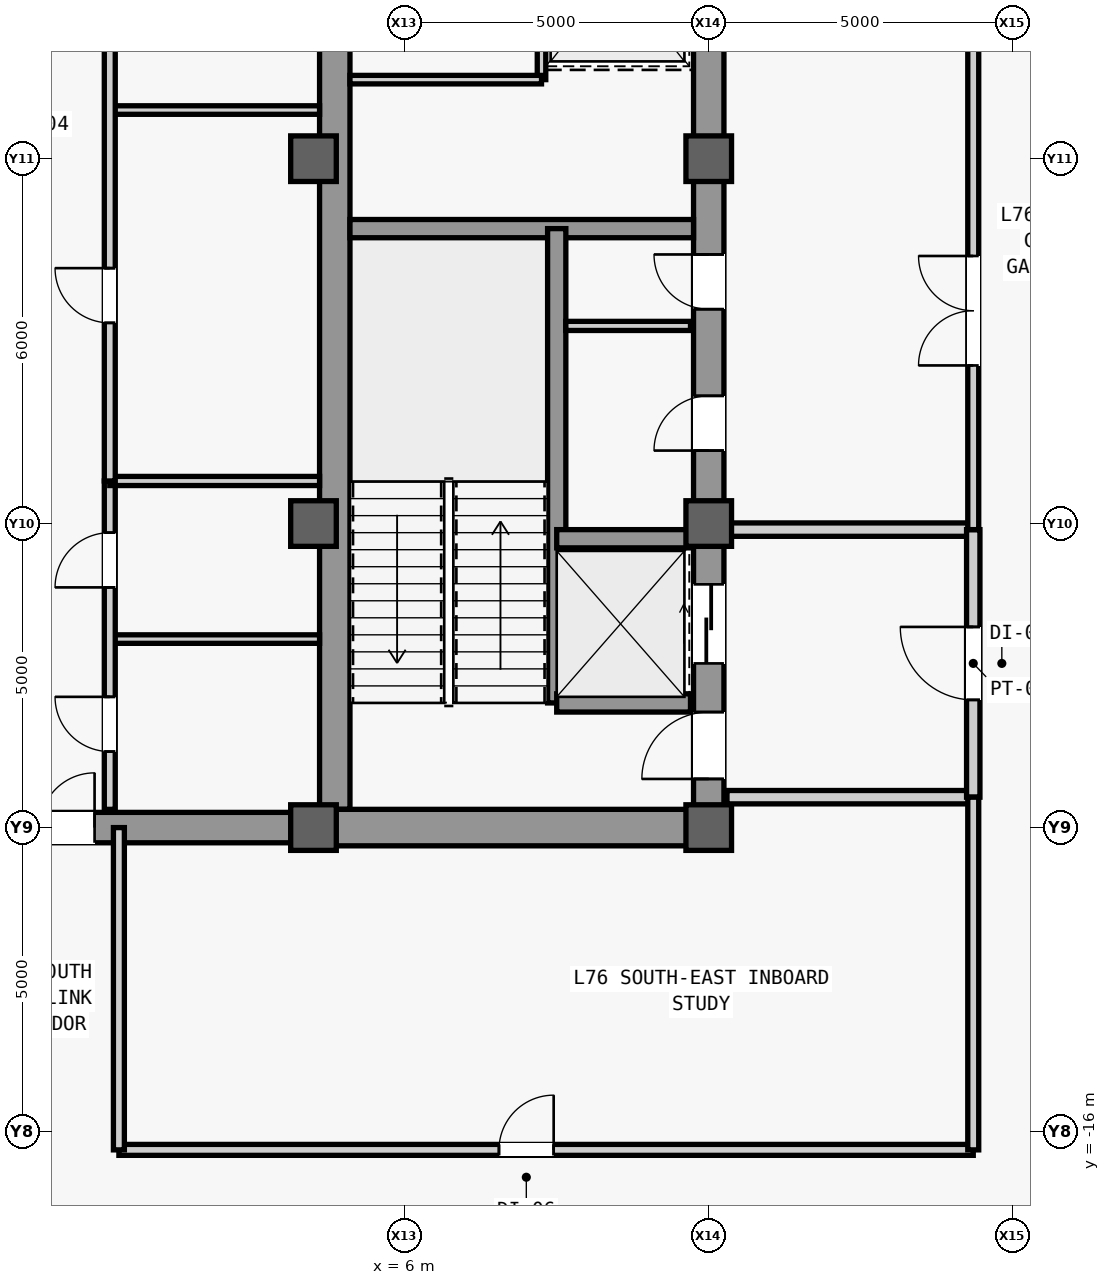
"""IFC4 building model, lengths in metres.
Left out: names, types, materials, properties, quantities, classifications, styles, units other than length and angle.
Written with IfcOpenShell. Run it as: python <this file> out.ifc"""

import sys

from ifc_helpers import new_model, si_unit, direction, frame, frame_2d, origin, origin_2d, place, context, subcontext, project, spatial, rectangle, extrude, source, transform, mapped, element, fill, save


model = new_model("IFC4")
c1 = context("Model", 3, precision=1e-05, world=origin(), true_north=direction((0.0, 1.0)))
c2 = subcontext(c1, "Body", "Model", "MODEL_VIEW")
j1 = project(units=[si_unit("LENGTHUNIT", "METRE"), si_unit("PLANEANGLEUNIT", "RADIAN")], contexts=[c1])
p1 = place(None, origin())
s1 = spatial("IfcSite", under=j1, at=p1, CompositionType="ELEMENT")
p2 = place(p1, origin())
s2 = spatial("IfcBuilding", under=s1, at=p2, CompositionType="ELEMENT")
p3 = place(p2, frame((0.0, 0.0, 321.5)))
s3 = spatial("IfcBuildingStorey", under=s2, at=p3, CompositionType="ELEMENT", Elevation=321.5)
m1 = source(origin(), c2, "Body", "SweptSolid", [
    extrude(rectangle(XDim=22.0, YDim=0.5, at=frame_2d((11.0, 0.0))), origin(), (0.0, 0.0, 1.0), 4.54),
])
p4 = place(p3, frame((11.0, -11.0, 0.0), z_axis=(0.0, 0.0, 1.0), x_axis=(0.0, 1.0, 0.0)))
e1 = element("IfcWall", 1, at=p4, inside=s3, PredefinedType="SHEAR", context=c2, shape_type="MappedRepresentation", body=[
    mapped(m1, transform((0.0, 0.0, 0.0), scale=1.0)),
])
m2 = source(origin(), c2, "Body", "SweptSolid", [
    extrude(rectangle(XDim=1.1, YDim=2.2, at=frame_2d((0.55, 1.1))), frame((0.0, 0.26, 0.0), z_axis=(0.0, -1.0, 0.0), x_axis=(1.0, 0.0, 0.0)), (0.0, 0.0, 1.0), 0.52),
])
p5 = place(p4, frame((0.8, 0.0, 0.0)))
e2 = element("IfcOpeningElement", 2, at=p5, cuts=e1, PredefinedType="OPENING", context=c2, shape_type="MappedRepresentation", body=[
    mapped(m2, transform((0.0, 0.0, 0.0), scale=1.0)),
])
m3 = source(origin(), c2, "Body", "SweptSolid", [
    extrude(rectangle(XDim=0.9, YDim=2.15, at=frame_2d((0.45, 1.075))), frame((0.0, 0.26, 0.0), z_axis=(0.0, -1.0, 0.0), x_axis=(1.0, 0.0, 0.0)), (0.0, 0.0, 1.0), 0.52),
])
p6 = place(p4, frame((6.2, 0.0, 0.0)))
e3 = element("IfcOpeningElement", 3, at=p6, cuts=e1, PredefinedType="OPENING", context=c2, shape_type="MappedRepresentation", body=[
    mapped(m3, transform((0.0, 0.0, 0.0), scale=1.0)),
])
p7 = place(p4, frame((8.525, 0.0, 0.0)))
e4 = element("IfcOpeningElement", 4, at=p7, cuts=e1, PredefinedType="OPENING", context=c2, shape_type="MappedRepresentation", body=[
    mapped(m3, transform((0.0, 0.0, 0.0), scale=1.0)),
])
m4 = source(origin(), c2, "Body", "SweptSolid", [
    extrude(rectangle(XDim=1.2, YDim=2.3, at=frame_2d((0.6, 1.15))), frame((0.0, 0.26, 0.0), z_axis=(0.0, -1.0, 0.0), x_axis=(1.0, 0.0, 0.0)), (0.0, 0.0, 1.0), 0.52),
])
p8 = place(p4, frame((17.6, 0.0, 0.0)))
e5 = element("IfcOpeningElement", 5, at=p8, cuts=e1, PredefinedType="OPENING", context=c2, shape_type="MappedRepresentation", body=[
    mapped(m4, transform((0.0, 0.0, 0.0), scale=1.0)),
])
p9 = place(p4, frame((19.6, 0.0, 0.0)))
e6 = element("IfcOpeningElement", 6, at=p9, cuts=e1, PredefinedType="OPENING", context=c2, shape_type="MappedRepresentation", body=[
    mapped(m4, transform((0.0, 0.0, 0.0), scale=1.0)),
])
m5 = source(origin(), c2, "Body", "SweptSolid", [
    extrude(rectangle(XDim=1.3, YDim=2.3, at=frame_2d((0.65, 1.15))), frame((0.0, 0.26, 0.0), z_axis=(0.0, -1.0, 0.0), x_axis=(1.0, 0.0, 0.0)), (0.0, 0.0, 1.0), 0.52),
])
p10 = place(p4, frame((2.7, 0.0, 0.0)))
e7 = element("IfcOpeningElement", 7, at=p10, cuts=e1, PredefinedType="OPENING", context=c2, shape_type="MappedRepresentation", body=[
    mapped(m5, transform((0.0, 0.0, 0.0), scale=1.0)),
])
p11 = place(p4, frame((13.35, 0.0, 0.0)))
e8 = element("IfcOpeningElement", 8, at=p11, cuts=e1, PredefinedType="OPENING", context=c2, shape_type="MappedRepresentation", body=[
    mapped(m5, transform((0.0, 0.0, 0.0), scale=1.0)),
])
m6 = source(origin(), c2, "Body", "SweptSolid", [
    extrude(rectangle(XDim=21.4, YDim=0.5, at=frame_2d((10.7, 0.0))), origin(), (0.0, 0.0, 1.0), 4.54),
])
p12 = place(p3, frame((4.85, -10.7, 0.0), z_axis=(0.0, 0.0, 1.0), x_axis=(0.0, 1.0, 0.0)))
e9 = element("IfcWall", 9, at=p12, inside=s3, PredefinedType="SHEAR", context=c2, shape_type="MappedRepresentation", body=[
    mapped(m6, transform((0.0, 0.0, 0.0), scale=1.0)),
])
m7 = source(origin(), c2, "Body", "SweptSolid", [
    extrude(rectangle(XDim=5.9, YDim=0.6, at=frame_2d((2.95, 0.0))), origin(), (0.0, 0.0, 1.0), 4.54),
])
p13 = place(p3, frame((4.85, -11.0, 0.0), z_axis=(0.0, 0.0, 1.0), x_axis=(1.0, 0.0, 0.0)))
e10 = element("IfcWall", 10, at=p13, inside=s3, PredefinedType="SHEAR", context=c2, shape_type="MappedRepresentation", body=[
    mapped(m7, transform((0.0, 0.0, 0.0), scale=1.0)),
])
m8 = source(origin(), c2, "Body", "SweptSolid", [
    extrude(rectangle(XDim=5.65, YDim=0.3, at=frame_2d((2.825, 0.0))), origin(), (0.0, 0.0, 1.0), 4.54),
])
p14 = place(p3, frame((5.1, -1.15, 0.0), z_axis=(0.0, 0.0, 1.0), x_axis=(1.0, 0.0, 0.0)))
e11 = element("IfcWall", 11, at=p14, inside=s3, PredefinedType="SHEAR", context=c2, shape_type="MappedRepresentation", body=[
    mapped(m8, transform((0.0, 0.0, 0.0), scale=1.0)),
])
m9 = source(origin(), c2, "Body", "SweptSolid", [
    extrude(rectangle(XDim=9.2, YDim=0.5, at=frame_2d((4.6, 0.0))), origin(), (0.0, 0.0, 1.0), 4.54),
])
p15 = place(p3, frame((-4.6, -11.0, 0.0), z_axis=(0.0, 0.0, 1.0), x_axis=(1.0, 0.0, 0.0)))
e12 = element("IfcWall", 12, at=p15, inside=s3, PredefinedType="SHEAR", context=c2, shape_type="MappedRepresentation", body=[
    mapped(m9, transform((0.0, 0.0, 0.0), scale=1.0)),
])
m10 = source(origin(), c2, "Body", "SweptSolid", [
    extrude(rectangle(XDim=1.8, YDim=2.25, at=frame_2d((0.9, 1.125))), frame((0.0, 0.26, 0.0), z_axis=(0.0, -1.0, 0.0), x_axis=(1.0, 0.0, 0.0)), (0.0, 0.0, 1.0), 0.52),
])
p16 = place(p15, frame((3.7, 0.0, 0.0)))
e13 = element("IfcOpeningElement", 13, at=p16, cuts=e12, PredefinedType="OPENING", context=c2, shape_type="MappedRepresentation", body=[
    mapped(m10, transform((0.0, 0.0, 0.0), scale=1.0)),
])
m11 = source(origin(), c2, "Body", "SweptSolid", [
    extrude(rectangle(XDim=0.75, YDim=0.75, at=origin_2d()), origin(), (0.0, 0.0, 1.0), 4.8),
])
for number, where, z_axis, x_axis in (
    (14, (4.5, -11.0, 0.0), (0.0, 0.0, 1.0), (1.0, 0.0, 0.0)),
    (15, (4.5, -6.0, 0.0), (0.0, 0.0, 1.0), (1.0, 0.0, 0.0)),
    (16, (4.5, 0.0, 0.0), (0.0, 0.0, 1.0), (1.0, 0.0, 0.0)),
    (17, (11.0, -11.0, 0.0), (0.0, 0.0, 1.0), (1.0, 0.0, 0.0)),
    (18, (11.0, -6.0, 0.0), (0.0, 0.0, 1.0), (1.0, 0.0, 0.0)),
    (19, (11.0, 0.0, 0.0), (0.0, 0.0, 1.0), (1.0, 0.0, 0.0)),
):
    element("IfcColumn", number, at=place(p3, frame(where, z_axis=z_axis, x_axis=x_axis)), inside=s3, PredefinedType="COLUMN", context=c2, shape_type="MappedRepresentation", body=[
        mapped(m11, transform((0.0, 0.0, 0.0), scale=1.0)),
    ])
m12 = source(origin(), c2, "Body", "SweptSolid", [
    extrude(rectangle(XDim=7.8, YDim=0.3, at=frame_2d((3.9, 0.0))), origin(), (0.0, 0.0, 1.0), 4.54),
])
p17 = place(p3, frame((8.5, -8.95, 0.0), z_axis=(0.0, 0.0, 1.0), x_axis=(0.0, 1.0, 0.0)))
e20 = element("IfcWall", 20, at=p17, inside=s3, PredefinedType="SHEAR", context=c2, shape_type="MappedRepresentation", body=[
    mapped(m12, transform((0.0, 0.0, 0.0), scale=1.0)),
])
m13 = source(origin(), c2, "Body", "SweptSolid", [
    extrude(rectangle(XDim=2.2, YDim=0.3, at=frame_2d((1.1, 0.0))), origin(), (0.0, 0.0, 1.0), 4.54),
])
for number, where, z_axis, x_axis in (
    (21, (8.5, -8.95, 0.0), (0.0, 0.0, 1.0), (1.0, 0.0, 0.0)),
    (22, (8.5, -6.25, 0.0), (0.0, 0.0, 1.0), (1.0, 0.0, 0.0)),
):
    element("IfcWall", number, at=place(p3, frame(where, z_axis=z_axis, x_axis=x_axis)), inside=s3, PredefinedType="SHEAR", context=c2, shape_type="MappedRepresentation", body=[
        mapped(m13, transform((0.0, 0.0, 0.0), scale=1.0)),
    ])
m14 = source(origin(), c2, "Body", "SweptSolid", [
    extrude(rectangle(XDim=2.05, YDim=0.15, at=frame_2d((1.025, 0.0))), origin(), (0.0, 0.0, 1.0), 4.54),
])
p18 = place(p3, frame((8.65, -2.75, 0.0), z_axis=(0.0, 0.0, 1.0), x_axis=(1.0, 0.0, 0.0)))
e23 = element("IfcWall", 23, at=p18, inside=s3, PredefinedType="PARTITIONING", context=c2, shape_type="MappedRepresentation", body=[
    mapped(m14, transform((0.0, 0.0, 0.0), scale=1.0)),
])
m15 = source(origin(), c2, "Body", "SweptSolid", [
    extrude(rectangle(XDim=9.4, YDim=0.14, at=frame_2d((4.7, 0.0))), origin(), (0.0, 0.0, 1.0), 4.54),
])
p19 = place(p3, frame((8.25, 1.3, 0.0), z_axis=(0.0, 0.0, 1.0), x_axis=(0.0, 1.0, 0.0)))
e24 = element("IfcWall", 24, at=p19, inside=s3, PredefinedType="PARTITIONING", context=c2, shape_type="MappedRepresentation", body=[
    mapped(m15, transform((0.0, 0.0, 0.0), scale=1.0)),
])
m16 = source(origin(), c2, "Body", "SweptSolid", [
    extrude(rectangle(XDim=3.15, YDim=0.14, at=frame_2d((1.575, 0.0))), origin(), (0.0, 0.0, 1.0), 4.54),
])
p20 = place(p3, frame((5.1, 1.3, 0.0), z_axis=(0.0, 0.0, 1.0), x_axis=(1.0, 0.0, 0.0)))
e25 = element("IfcWall", 25, at=p20, inside=s3, PredefinedType="PARTITIONING", context=c2, shape_type="MappedRepresentation", body=[
    mapped(m16, transform((0.0, 0.0, 0.0), scale=1.0)),
])
m17 = source(origin(), c2, "Body", "SweptSolid", [
    extrude(rectangle(XDim=4.05, YDim=0.22, at=frame_2d((2.025, 0.0))), origin(), (0.0, 0.0, 1.0), 4.54),
])
p21 = place(p3, frame((11.3, -10.5, 0.0), z_axis=(0.0, 0.0, 1.0), x_axis=(1.0, 0.0, 0.0)))
e26 = element("IfcWall", 26, at=p21, inside=s3, PredefinedType="PARTITIONING", context=c2, shape_type="MappedRepresentation", body=[
    mapped(m17, transform((0.0, 0.0, 0.0), scale=1.0)),
])
m18 = source(origin(), c2, "Body", "SweptSolid", [
    extrude(rectangle(XDim=4.05, YDim=0.22, at=frame_2d((2.025, 0.0))), origin(), (0.0, 0.0, 1.0), 2.74),
])
p22 = place(p3, frame((11.3, -6.1, 0.0), z_axis=(0.0, 0.0, 1.0), x_axis=(1.0, 0.0, 0.0)))
e27 = element("IfcWall", 27, at=p22, inside=s3, PredefinedType="PARTITIONING", context=c2, shape_type="MappedRepresentation", body=[
    mapped(m18, transform((0.0, 0.0, 0.0), scale=1.0)),
])
m19 = source(origin(), c2, "Body", "SweptSolid", [
    extrude(rectangle(XDim=4.4, YDim=0.22, at=frame_2d((2.2, 0.0))), origin(), (0.0, 0.0, 1.0), 4.54),
])
p23 = place(p3, frame((15.35, -10.5, 0.0), z_axis=(0.0, 0.0, 1.0), x_axis=(0.0, 1.0, 0.0)))
e28 = element("IfcWall", 28, at=p23, inside=s3, PredefinedType="PARTITIONING", context=c2, shape_type="MappedRepresentation", body=[
    mapped(m19, transform((0.0, 0.0, 0.0), scale=1.0)),
])
m20 = source(origin(), c2, "Body", "SweptSolid", [
    extrude(rectangle(XDim=1.2, YDim=2.2, at=frame_2d((0.6, 1.1))), frame((0.0, 0.12, 0.0), z_axis=(0.0, -1.0, 0.0), x_axis=(1.0, 0.0, 0.0)), (0.0, 0.0, 1.0), 0.24),
])
p24 = place(p23, frame((1.6, 0.0, 0.0)))
e29 = element("IfcOpeningElement", 29, at=p24, cuts=e28, PredefinedType="OPENING", context=c2, shape_type="MappedRepresentation", body=[
    mapped(m20, transform((0.0, 0.0, 0.0), scale=1.0)),
])
m21 = source(origin(), c2, "Body", "SweptSolid", [
    extrude(rectangle(XDim=16.6, YDim=0.18, at=frame_2d((8.3, 0.0))), origin(), (0.0, 0.0, 1.0), 4.54),
])
p25 = place(p3, frame((15.35, -6.1, 0.0), z_axis=(0.0, 0.0, 1.0), x_axis=(0.0, 1.0, 0.0)))
e30 = element("IfcWall", 30, at=p25, inside=s3, PredefinedType="PARTITIONING", context=c2, shape_type="MappedRepresentation", body=[
    mapped(m21, transform((0.0, 0.0, 0.0), scale=1.0)),
])
m22 = source(origin(), c2, "Body", "SweptSolid", [
    extrude(rectangle(XDim=1.8, YDim=2.25, at=frame_2d((0.9, 1.125))), frame((0.0, 0.1, 0.0), z_axis=(0.0, -1.0, 0.0), x_axis=(1.0, 0.0, 0.0)), (0.0, 0.0, 1.0), 0.2),
])
p26 = place(p25, frame((2.7, 0.0, 0.0)))
e31 = element("IfcOpeningElement", 31, at=p26, cuts=e30, PredefinedType="OPENING", context=c2, shape_type="MappedRepresentation", body=[
    mapped(m22, transform((0.0, 0.0, 0.0), scale=1.0)),
])
p27 = place(p25, frame((13.0, 0.0, 0.0)))
e32 = element("IfcOpeningElement", 32, at=p27, cuts=e30, PredefinedType="OPENING", context=c2, shape_type="MappedRepresentation", body=[
    mapped(m22, transform((0.0, 0.0, 0.0), scale=1.0)),
])
m23 = source(origin(), c2, "Body", "SweptSolid", [
    extrude(rectangle(XDim=3.45, YDim=0.14, at=frame_2d((1.725, 0.0))), origin(), (0.0, 0.0, 1.0), 4.54),
])
p28 = place(p3, frame((1.15, -7.9, 0.0), z_axis=(0.0, 0.0, 1.0), x_axis=(1.0, 0.0, 0.0)))
e33 = element("IfcWall", 33, at=p28, inside=s3, PredefinedType="PARTITIONING", context=c2, shape_type="MappedRepresentation", body=[
    mapped(m23, transform((0.0, 0.0, 0.0), scale=1.0)),
])
m24 = source(origin(), c2, "Body", "SweptSolid", [
    extrude(rectangle(XDim=5.4, YDim=0.18, at=frame_2d((2.7, 0.0))), origin(), (0.0, 0.0, 1.0), 4.54),
])
p29 = place(p3, frame((1.15, -10.7, 0.0), z_axis=(0.0, 0.0, 1.0), x_axis=(0.0, 1.0, 0.0)))
e34 = element("IfcWall", 34, at=p29, inside=s3, PredefinedType="PARTITIONING", context=c2, shape_type="MappedRepresentation", body=[
    mapped(m24, transform((0.0, 0.0, 0.0), scale=1.0)),
])
m25 = source(origin(), c2, "Body", "SweptSolid", [
    extrude(rectangle(XDim=0.9, YDim=2.15, at=frame_2d((0.45, 1.075))), frame((0.0, 0.1, 0.0), z_axis=(0.0, -1.0, 0.0), x_axis=(1.0, 0.0, 0.0)), (0.0, 0.0, 1.0), 0.2),
])
p30 = place(p29, frame((0.95, 0.0, 0.0)))
e35 = element("IfcOpeningElement", 35, at=p30, cuts=e34, PredefinedType="OPENING", context=c2, shape_type="MappedRepresentation", body=[
    mapped(m25, transform((0.0, 0.0, 0.0), scale=1.0)),
])
p31 = place(p29, frame((3.65, 0.0, 0.0)))
e36 = element("IfcOpeningElement", 36, at=p31, cuts=e34, PredefinedType="OPENING", context=c2, shape_type="MappedRepresentation", body=[
    mapped(m25, transform((0.0, 0.0, 0.0), scale=1.0)),
])
m26 = source(origin(), c2, "Body", "SweptSolid", [
    extrude(rectangle(XDim=3.45, YDim=0.15, at=frame_2d((1.725, 0.0))), origin(), (0.0, 0.0, 1.0), 4.54),
])
p32 = place(p3, frame((1.15, -5.3, 0.0), z_axis=(0.0, 0.0, 1.0), x_axis=(1.0, 0.0, 0.0)))
e37 = element("IfcWall", 37, at=p32, inside=s3, PredefinedType="PARTITIONING", context=c2, shape_type="MappedRepresentation", body=[
    mapped(m26, transform((0.0, 0.0, 0.0), scale=1.0)),
])
p33 = place(p3, frame((1.15, 0.8, 0.0), z_axis=(0.0, 0.0, 1.0), x_axis=(1.0, 0.0, 0.0)))
e38 = element("IfcWall", 38, at=p33, inside=s3, PredefinedType="PARTITIONING", context=c2, shape_type="MappedRepresentation", body=[
    mapped(m23, transform((0.0, 0.0, 0.0), scale=1.0)),
])
m27 = source(origin(), c2, "Body", "SweptSolid", [
    extrude(rectangle(XDim=10.6, YDim=0.18, at=frame_2d((5.3, 0.0))), origin(), (0.0, 0.0, 1.0), 4.54),
])
p34 = place(p3, frame((1.15, -5.3, 0.0), z_axis=(0.0, 0.0, 1.0), x_axis=(0.0, 1.0, 0.0)))
e39 = element("IfcWall", 39, at=p34, inside=s3, PredefinedType="PARTITIONING", context=c2, shape_type="MappedRepresentation", body=[
    mapped(m27, transform((0.0, 0.0, 0.0), scale=1.0)),
])
p35 = place(p34, frame((2.6, 0.0, 0.0)))
e40 = element("IfcOpeningElement", 40, at=p35, cuts=e39, PredefinedType="OPENING", context=c2, shape_type="MappedRepresentation", body=[
    mapped(m25, transform((0.0, 0.0, 0.0), scale=1.0)),
])
p36 = place(p34, frame((7.25, 0.0, 0.0)))
e41 = element("IfcOpeningElement", 41, at=p36, cuts=e39, PredefinedType="OPENING", context=c2, shape_type="MappedRepresentation", body=[
    mapped(m25, transform((0.0, 0.0, 0.0), scale=1.0)),
])
p37 = place(p34, frame((9.475, 0.0, 0.0)))
e42 = element("IfcOpeningElement", 42, at=p37, cuts=e39, PredefinedType="OPENING", context=c2, shape_type="MappedRepresentation", body=[
    mapped(m25, transform((0.0, 0.0, 0.0), scale=1.0)),
])
m28 = source(origin(), c2, "Body", "SweptSolid", [
    extrude(rectangle(XDim=14.05, YDim=0.18, at=frame_2d((7.025, 0.0))), origin(), (0.0, 0.0, 1.0), 4.54),
])
p38 = place(p3, frame((1.3, -16.3, 0.0), z_axis=(0.0, 0.0, 1.0), x_axis=(1.0, 0.0, 0.0)))
e43 = element("IfcWall", 43, at=p38, inside=s3, PredefinedType="PARTITIONING", context=c2, shape_type="MappedRepresentation", body=[
    mapped(m28, transform((0.0, 0.0, 0.0), scale=1.0)),
])
p39 = place(p38, frame((6.25, 0.0, 0.0)))
e44 = element("IfcOpeningElement", 44, at=p39, cuts=e43, PredefinedType="OPENING", context=c2, shape_type="MappedRepresentation", body=[
    mapped(m25, transform((0.0, 0.0, 0.0), scale=1.0)),
])
m29 = source(origin(), c2, "Body", "SweptSolid", [
    extrude(rectangle(XDim=5.3, YDim=0.18, at=frame_2d((2.65, 0.0))), origin(), (0.0, 0.0, 1.0), 4.54),
])
p40 = place(p3, frame((1.3, -16.3, 0.0), z_axis=(0.0, 0.0, 1.0), x_axis=(0.0, 1.0, 0.0)))
e45 = element("IfcWall", 45, at=p40, inside=s3, PredefinedType="PARTITIONING", context=c2, shape_type="MappedRepresentation", body=[
    mapped(m29, transform((0.0, 0.0, 0.0), scale=1.0)),
])
m30 = source(origin(), c2, "Body", "SweptSolid", [
    extrude(rectangle(XDim=5.8, YDim=0.18, at=frame_2d((2.9, 0.0))), origin(), (0.0, 0.0, 1.0), 4.54),
])
p41 = place(p3, frame((15.35, -16.3, 0.0), z_axis=(0.0, 0.0, 1.0), x_axis=(0.0, 1.0, 0.0)))
e46 = element("IfcWall", 46, at=p41, inside=s3, PredefinedType="PARTITIONING", context=c2, shape_type="MappedRepresentation", body=[
    mapped(m30, transform((0.0, 0.0, 0.0), scale=1.0)),
])
m31 = source(origin(), c2, "Body", "SweptSolid", [
    extrude(rectangle(XDim=1.1, YDim=2.2, at=frame_2d((0.55, 1.1))), frame((0.0, 0.025, 0.0), z_axis=(0.0, -1.0, 0.0), x_axis=(1.0, 0.0, 0.0)), (0.0, 0.0, 1.0), 0.05),
])
p42 = place(p5, origin())
e47 = element("IfcDoor", 47, at=p42, inside=s3, OperationType="SINGLE_SWING_LEFT", PredefinedType="DOOR", context=c2, shape_type="MappedRepresentation", body=[
    mapped(m31, transform((0.0, 0.0, 0.0), scale=1.0)),
])
fill(e2, e47)
m32 = source(origin(), c2, "Body", "SweptSolid", [
    extrude(rectangle(XDim=0.9, YDim=2.15, at=frame_2d((0.45, 1.075))), frame((0.0, 0.025, 0.0), z_axis=(0.0, -1.0, 0.0), x_axis=(1.0, 0.0, 0.0)), (0.0, 0.0, 1.0), 0.05),
])
p43 = place(p6, origin())
e48 = element("IfcDoor", 48, at=p43, inside=s3, OperationType="SINGLE_SWING_LEFT", PredefinedType="DOOR", context=c2, shape_type="MappedRepresentation", body=[
    mapped(m32, transform((0.0, 0.0, 0.0), scale=1.0)),
])
fill(e3, e48)
p44 = place(p7, origin())
e49 = element("IfcDoor", 49, at=p44, inside=s3, OperationType="SINGLE_SWING_RIGHT", PredefinedType="DOOR", context=c2, shape_type="MappedRepresentation", body=[
    mapped(m32, transform((0.0, 0.0, 0.0), scale=1.0)),
])
fill(e4, e49)
m33 = source(origin(), c2, "Body", "SweptSolid", [
    extrude(rectangle(XDim=1.2, YDim=2.2, at=frame_2d((0.6, 1.1))), frame((0.0, 0.025, 0.0), z_axis=(0.0, -1.0, 0.0), x_axis=(1.0, 0.0, 0.0)), (0.0, 0.0, 1.0), 0.05),
])
p45 = place(p24, origin())
e50 = element("IfcDoor", 50, at=p45, inside=s3, OperationType="SINGLE_SWING_RIGHT", PredefinedType="DOOR", context=c2, shape_type="MappedRepresentation", body=[
    mapped(m33, transform((0.0, 0.0, 0.0), scale=1.0)),
])
fill(e29, e50)
m34 = source(origin(), c2, "Body", "SweptSolid", [
    extrude(rectangle(XDim=1.8, YDim=2.25, at=frame_2d((0.9, 1.125))), frame((0.0, 0.025, 0.0), z_axis=(0.0, -1.0, 0.0), x_axis=(1.0, 0.0, 0.0)), (0.0, 0.0, 1.0), 0.05),
])
p46 = place(p26, origin())
e51 = element("IfcDoor", 51, at=p46, inside=s3, OperationType="SINGLE_SWING_RIGHT", PredefinedType="DOOR", context=c2, shape_type="MappedRepresentation", body=[
    mapped(m34, transform((0.0, 0.0, 0.0), scale=1.0)),
])
fill(e31, e51)
p47 = place(p30, origin())
e52 = element("IfcDoor", 52, at=p47, inside=s3, OperationType="SINGLE_SWING_RIGHT", PredefinedType="DOOR", context=c2, shape_type="MappedRepresentation", body=[
    mapped(m32, transform((0.0, 0.0, 0.0), scale=1.0)),
])
fill(e35, e52)
p48 = place(p31, origin())
e53 = element("IfcDoor", 53, at=p48, inside=s3, OperationType="SINGLE_SWING_LEFT", PredefinedType="DOOR", context=c2, shape_type="MappedRepresentation", body=[
    mapped(m32, transform((0.0, 0.0, 0.0), scale=1.0)),
])
fill(e36, e53)
p49 = place(p16, origin())
e54 = element("IfcDoor", 54, at=p49, inside=s3, OperationType="SINGLE_SWING_LEFT", PredefinedType="DOOR", context=c2, shape_type="MappedRepresentation", body=[
    mapped(m34, transform((0.0, 0.0, 0.0), scale=1.0)),
])
fill(e13, e54)
p50 = place(p35, origin())
e55 = element("IfcDoor", 55, at=p50, inside=s3, OperationType="SINGLE_SWING_RIGHT", PredefinedType="DOOR", context=c2, shape_type="MappedRepresentation", body=[
    mapped(m32, transform((0.0, 0.0, 0.0), scale=1.0)),
])
fill(e40, e55)
p51 = place(p39, origin())
e56 = element("IfcDoor", 56, at=p51, inside=s3, OperationType="SINGLE_SWING_RIGHT", PredefinedType="DOOR", context=c2, shape_type="MappedRepresentation", body=[
    mapped(m32, transform((0.0, 0.0, 0.0), scale=1.0)),
])
fill(e44, e56)
m35 = source(origin(), c2, "Body", "SweptSolid", [
    extrude(rectangle(XDim=1.3, YDim=2.3, at=frame_2d((0.65, 1.15))), frame((0.0, 0.025, 0.0), z_axis=(0.0, -1.0, 0.0), x_axis=(1.0, 0.0, 0.0)), (0.0, 0.0, 1.0), 0.05),
])
p52 = place(p10, origin())
e57 = element("IfcDoor", 57, at=p52, inside=s3, OperationType="SLIDING_TO_LEFT", PredefinedType="DOOR", context=c2, shape_type="MappedRepresentation", body=[
    mapped(m35, transform((0.0, 0.0, 0.0), scale=1.0)),
])
fill(e7, e57)
save(model, sys.argv[1])
